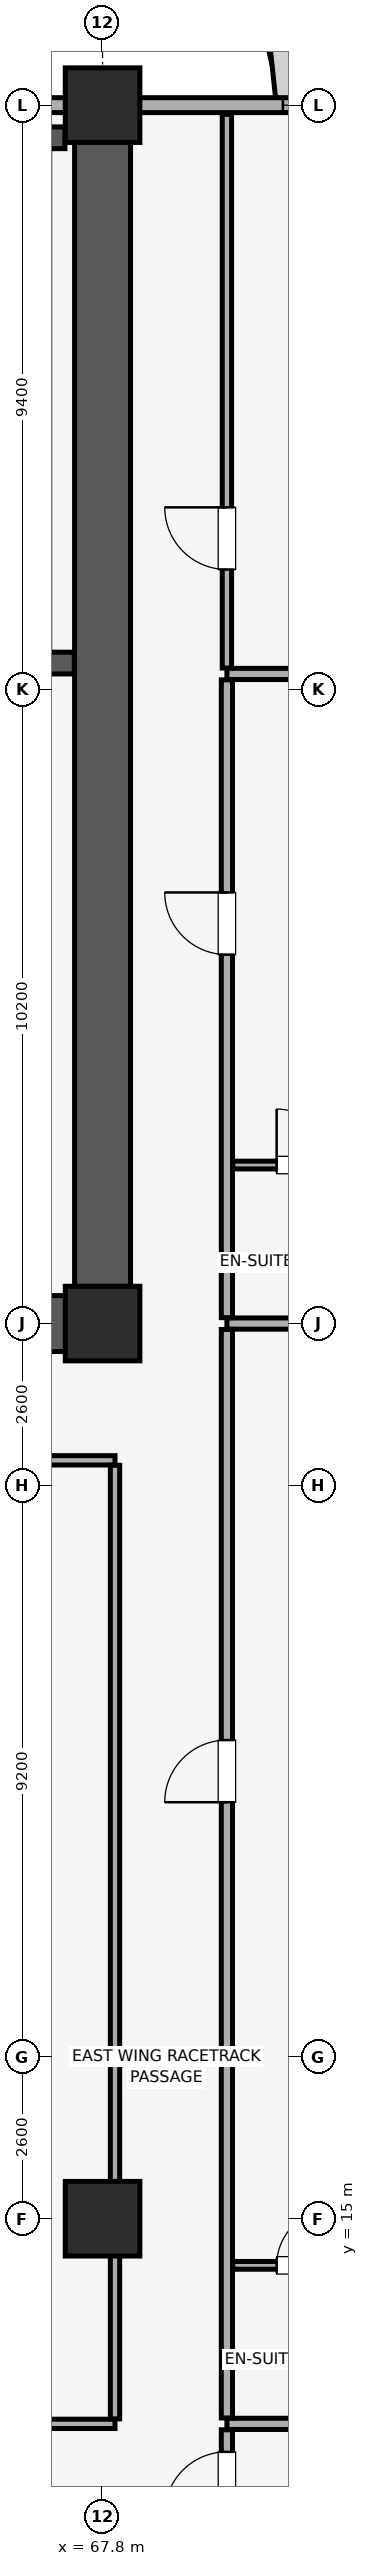
"""IFC4 building model, lengths in metres.
Left out: names, types, materials, properties, quantities, classifications, styles, units other than length and angle.
Written with IfcOpenShell. Run it as: python <this file> out.ifc"""

import sys

from ifc_helpers import new_model, si_unit, direction, frame, frame_2d, origin, origin_2d, place, context, subcontext, project, spatial, rectangle, extrude, element, fill, save


model = new_model("IFC4")
c1 = context("Model", 3, precision=1e-05, world=origin(), true_north=direction((0.0, 1.0)))
c2 = subcontext(c1, "Body", "Model", "MODEL_VIEW")
j1 = project(units=[si_unit("LENGTHUNIT", "METRE"), si_unit("PLANEANGLEUNIT", "RADIAN")], contexts=[c1])
p1 = place(None, origin())
s1 = spatial("IfcSite", under=j1, at=p1, CompositionType="ELEMENT")
p2 = place(p1, origin())
s2 = spatial("IfcBuilding", under=s1, at=p2, CompositionType="ELEMENT")
p3 = place(p2, frame((0.0, 0.0, 135.35)))
s3 = spatial("IfcBuildingStorey", under=s2, at=p3, CompositionType="ELEMENT", Elevation=135.35)
for number, where, z_axis, x_axis in (
    (1, (67.8, 15.0, 0.0), (0.0, 0.0, 1.0), (1.0, 0.0, 0.0)),
    (2, (67.8, 29.4, 0.0), (0.0, 0.0, 1.0), (1.0, 0.0, 0.0)),
    (3, (67.8, 49.0, 0.0), (0.0, 0.0, 1.0), (1.0, 0.0, 0.0)),
):
    element("IfcColumn", number, at=place(p3, frame(where, z_axis=z_axis, x_axis=x_axis)), inside=s3, PredefinedType="COLUMN", context=c2, shape_type="SweptSolid", body=[
        extrude(rectangle(XDim=1.2, YDim=1.2, at=origin_2d()), origin(), (0.0, 0.0, 1.0), 3.56),
    ])
p4 = place(p3, frame((77.0, 49.0, 0.0), z_axis=(0.0, 0.0, 1.0), x_axis=(-1.0, 0.0, 0.0)))
e4 = element("IfcWall", 4, at=p4, inside=s3, PredefinedType="SOLIDWALL", context=c2, shape_type="SweptSolid", body=[
    extrude(rectangle(XDim=70.0, YDim=0.24, at=frame_2d((35.0, 0.0))), origin(), (0.0, 0.0, 1.0), 2.61),
])
p5 = place(p4, frame((63.7, 0.0, 0.85)))
e5 = element("IfcOpeningElement", 5, at=p5, cuts=e4, PredefinedType="OPENING", context=c2, shape_type="SweptSolid", body=[
    extrude(rectangle(XDim=3.0, YDim=1.5, at=frame_2d((1.5, 0.75))), frame((0.0, 0.13, 0.0), z_axis=(0.0, -1.0, 0.0), x_axis=(1.0, 0.0, 0.0)), (0.0, 0.0, 1.0), 0.26),
])
p6 = place(p4, frame((3.3, 0.0, 0.85)))
e6 = element("IfcOpeningElement", 6, at=p6, cuts=e4, PredefinedType="OPENING", context=c2, shape_type="SweptSolid", body=[
    extrude(rectangle(XDim=3.0, YDim=1.5, at=frame_2d((1.5, 0.75))), frame((0.0, 0.13, 0.0), z_axis=(0.0, -1.0, 0.0), x_axis=(1.0, 0.0, 0.0)), (0.0, 0.0, 1.0), 0.26),
])
p7 = place(p4, frame((48.565, 0.0, 0.9)))
e7 = element("IfcOpeningElement", 7, at=p7, cuts=e4, PredefinedType="OPENING", context=c2, shape_type="SweptSolid", body=[
    extrude(rectangle(XDim=1.5, YDim=1.4, at=frame_2d((0.75, 0.7))), frame((0.0, 0.13, 0.0), z_axis=(0.0, -1.0, 0.0), x_axis=(1.0, 0.0, 0.0)), (0.0, 0.0, 1.0), 0.26),
])
p8 = place(p4, frame((41.75, 0.0, 0.9)))
e8 = element("IfcOpeningElement", 8, at=p8, cuts=e4, PredefinedType="OPENING", context=c2, shape_type="SweptSolid", body=[
    extrude(rectangle(XDim=1.5, YDim=1.4, at=frame_2d((0.75, 0.7))), frame((0.0, 0.13, 0.0), z_axis=(0.0, -1.0, 0.0), x_axis=(1.0, 0.0, 0.0)), (0.0, 0.0, 1.0), 0.26),
])
p9 = place(p4, frame((25.3, 0.0, 0.9)))
e9 = element("IfcOpeningElement", 9, at=p9, cuts=e4, PredefinedType="OPENING", context=c2, shape_type="SweptSolid", body=[
    extrude(rectangle(XDim=1.5, YDim=1.4, at=frame_2d((0.75, 0.7))), frame((0.0, 0.13, 0.0), z_axis=(0.0, -1.0, 0.0), x_axis=(1.0, 0.0, 0.0)), (0.0, 0.0, 1.0), 0.26),
])
p10 = place(p4, frame((20.685, 0.0, 0.9)))
e10 = element("IfcOpeningElement", 10, at=p10, cuts=e4, PredefinedType="OPENING", context=c2, shape_type="SweptSolid", body=[
    extrude(rectangle(XDim=1.5, YDim=1.4, at=frame_2d((0.75, 0.7))), frame((0.0, 0.13, 0.0), z_axis=(0.0, -1.0, 0.0), x_axis=(1.0, 0.0, 0.0)), (0.0, 0.0, 1.0), 0.26),
])
p11 = place(p3, frame((67.8, 29.4, 0.0), z_axis=(0.0, 0.0, 1.0), x_axis=(0.0, 1.0, 0.0)))
e11 = element("IfcWall", 11, at=p11, inside=s3, PredefinedType="SHEAR", context=c2, shape_type="SweptSolid", body=[
    extrude(rectangle(XDim=19.2, YDim=0.9, at=frame_2d((9.6, 0.0))), origin(), (0.0, 0.0, 1.0), 3.56),
])
p12 = place(p3, frame((60.4, 29.4, 0.0), z_axis=(0.0, 0.0, 1.0), x_axis=(1.0, 0.0, 0.0)))
e12 = element("IfcWall", 12, at=p12, inside=s3, PredefinedType="SHEAR", context=c2, shape_type="SweptSolid", body=[
    extrude(rectangle(XDim=6.945, YDim=0.9, at=frame_2d((3.473, 0.0))), origin(), (0.0, 0.0, 1.0), 3.56),
])
p13 = place(p3, frame((63.145, 40.025, 0.0), z_axis=(0.0, 0.0, 1.0), x_axis=(1.0, 0.0, 0.0)))
e13 = element("IfcWall", 13, at=p13, inside=s3, PredefinedType="SHEAR", context=c2, shape_type="SweptSolid", body=[
    extrude(rectangle(XDim=4.2, YDim=0.35, at=frame_2d((2.1, 0.0))), origin(), (0.0, 0.0, 1.0), 3.56),
])
p14 = place(p13, frame((1.24, 0.0, 0.0)))
e14 = element("IfcOpeningElement", 14, at=p14, cuts=e13, PredefinedType="OPENING", context=c2, shape_type="SweptSolid", body=[
    extrude(rectangle(XDim=1.15, YDim=2.15, at=frame_2d((0.575, 1.075))), frame((0.0, 0.185, 0.0), z_axis=(0.0, -1.0, 0.0), x_axis=(1.0, 0.0, 0.0)), (0.0, 0.0, 1.0), 0.37),
])
p15 = place(p3, frame((63.145, 48.475, 0.0), z_axis=(0.0, 0.0, 1.0), x_axis=(1.0, 0.0, 0.0)))
e15 = element("IfcWall", 15, at=p15, inside=s3, PredefinedType="SHEAR", context=c2, shape_type="SweptSolid", body=[
    extrude(rectangle(XDim=4.05, YDim=0.35, at=frame_2d((2.025, 0.0))), origin(), (0.0, 0.0, 1.0), 3.56),
])
p16 = place(p3, frame((69.8, 11.7, 0.0), z_axis=(0.0, 0.0, 1.0), x_axis=(1.0, 0.0, 0.0)))
e16 = element("IfcWall", 16, at=p16, inside=s3, PredefinedType="PARTITIONING", context=c2, shape_type="SweptSolid", body=[
    extrude(rectangle(XDim=11.05, YDim=0.18, at=frame_2d((5.525, 0.0))), origin(), (0.0, 0.0, 1.0), 3.56),
])
p17 = place(p3, frame((69.8, 9.895, 0.0), z_axis=(0.0, 0.0, 1.0), x_axis=(0.0, 1.0, 0.0)))
e17 = element("IfcWall", 17, at=p17, inside=s3, PredefinedType="PARTITIONING", context=c2, shape_type="SweptSolid", body=[
    extrude(rectangle(XDim=1.71, YDim=0.18, at=frame_2d((0.855, 0.0))), origin(), (0.0, 0.0, 1.0), 3.56),
])
p18 = place(p17, frame((0.355, 0.0, 0.0)))
e18 = element("IfcOpeningElement", 18, at=p18, cuts=e17, PredefinedType="OPENING", context=c2, shape_type="SweptSolid", body=[
    extrude(rectangle(XDim=1.0, YDim=2.15, at=frame_2d((0.5, 1.075))), frame((0.0, 0.1, 0.0), z_axis=(0.0, -1.0, 0.0), x_axis=(1.0, 0.0, 0.0)), (0.0, 0.0, 1.0), 0.2),
])
p19 = place(p3, frame((69.8, 29.4, 0.0), z_axis=(0.0, 0.0, 1.0), x_axis=(1.0, 0.0, 0.0)))
e19 = element("IfcWall", 19, at=p19, inside=s3, PredefinedType="PARTITIONING", context=c2, shape_type="SweptSolid", body=[
    extrude(rectangle(XDim=11.05, YDim=0.18, at=frame_2d((5.525, 0.0))), origin(), (0.0, 0.0, 1.0), 2.91),
])
p20 = place(p3, frame((69.8, 11.795, 0.0), z_axis=(0.0, 0.0, 1.0), x_axis=(0.0, 1.0, 0.0)))
e20 = element("IfcWall", 20, at=p20, inside=s3, PredefinedType="PARTITIONING", context=c2, shape_type="SweptSolid", body=[
    extrude(rectangle(XDim=17.51, YDim=0.18, at=frame_2d((8.755, 0.0))), origin(), (0.0, 0.0, 1.0), 3.56),
])
p21 = place(p20, frame((9.905, 0.0, 0.0)))
e21 = element("IfcOpeningElement", 21, at=p21, cuts=e20, PredefinedType="OPENING", context=c2, shape_type="SweptSolid", body=[
    extrude(rectangle(XDim=1.0, YDim=2.15, at=frame_2d((0.5, 1.075))), frame((0.0, 0.1, 0.0), z_axis=(0.0, -1.0, 0.0), x_axis=(1.0, 0.0, 0.0)), (0.0, 0.0, 1.0), 0.2),
])
p22 = place(p3, frame((69.895, 14.25, 0.0), z_axis=(0.0, 0.0, 1.0), x_axis=(1.0, 0.0, 0.0)))
e22 = element("IfcWall", 22, at=p22, inside=s3, PredefinedType="PARTITIONING", context=c2, shape_type="SweptSolid", body=[
    extrude(rectangle(XDim=2.405, YDim=0.125, at=frame_2d((1.203, 0.0))), origin(), (0.0, 0.0, 1.0), 3.56),
])
p23 = place(p22, frame((0.705, 0.0, 0.0)))
e23 = element("IfcOpeningElement", 23, at=p23, cuts=e22, PredefinedType="OPENING", context=c2, shape_type="SweptSolid", body=[
    extrude(rectangle(XDim=0.9, YDim=2.1, at=frame_2d((0.45, 1.05))), frame((0.0, 0.073, 0.0), z_axis=(0.0, -1.0, 0.0), x_axis=(1.0, 0.0, 0.0)), (0.0, 0.0, 1.0), 0.145),
])
p24 = place(p3, frame((59.0, 11.7, 0.0), z_axis=(0.0, 0.0, 1.0), x_axis=(1.0, 0.0, 0.0)))
e24 = element("IfcWall", 24, at=p24, inside=s3, PredefinedType="PARTITIONING", context=c2, shape_type="SweptSolid", body=[
    extrude(rectangle(XDim=9.0, YDim=0.15, at=frame_2d((4.5, 0.0))), origin(), (0.0, 0.0, 1.0), 3.56),
])
p25 = place(p3, frame((59.0, 27.2, 0.0), z_axis=(0.0, 0.0, 1.0), x_axis=(1.0, 0.0, 0.0)))
e25 = element("IfcWall", 25, at=p25, inside=s3, PredefinedType="PARTITIONING", context=c2, shape_type="SweptSolid", body=[
    extrude(rectangle(XDim=9.0, YDim=0.15, at=frame_2d((4.5, 0.0))), origin(), (0.0, 0.0, 1.0), 3.56),
])
p26 = place(p25, frame((4.0, 0.0, 0.0)))
e26 = element("IfcOpeningElement", 26, at=p26, cuts=e25, PredefinedType="OPENING", context=c2, shape_type="SweptSolid", body=[
    extrude(rectangle(XDim=1.0, YDim=2.15, at=frame_2d((0.5, 1.075))), frame((0.0, 0.085, 0.0), z_axis=(0.0, -1.0, 0.0), x_axis=(1.0, 0.0, 0.0)), (0.0, 0.0, 1.0), 0.17),
])
p27 = place(p3, frame((68.0, 11.78, 0.0), z_axis=(0.0, 0.0, 1.0), x_axis=(0.0, 1.0, 0.0)))
e27 = element("IfcWall", 27, at=p27, inside=s3, PredefinedType="PARTITIONING", context=c2, shape_type="SweptSolid", body=[
    extrude(rectangle(XDim=15.34, YDim=0.15, at=frame_2d((7.67, 0.0))), origin(), (0.0, 0.0, 1.0), 3.01),
])
p28 = place(p3, frame((69.8, 39.85, 0.0), z_axis=(0.0, 0.0, 1.0), x_axis=(1.0, 0.0, 0.0)))
e28 = element("IfcWall", 28, at=p28, inside=s3, PredefinedType="PARTITIONING", context=c2, shape_type="SweptSolid", body=[
    extrude(rectangle(XDim=11.05, YDim=0.18, at=frame_2d((5.525, 0.0))), origin(), (0.0, 0.0, 1.0), 3.56),
])
p29 = place(p3, frame((69.8, 29.495, 0.0), z_axis=(0.0, 0.0, 1.0), x_axis=(0.0, 1.0, 0.0)))
e29 = element("IfcWall", 29, at=p29, inside=s3, PredefinedType="PARTITIONING", context=c2, shape_type="SweptSolid", body=[
    extrude(rectangle(XDim=10.26, YDim=0.18, at=frame_2d((5.13, 0.0))), origin(), (0.0, 0.0, 1.0), 3.56),
])
p30 = place(p29, frame((5.84, 0.0, 0.0)))
e30 = element("IfcOpeningElement", 30, at=p30, cuts=e29, PredefinedType="OPENING", context=c2, shape_type="SweptSolid", body=[
    extrude(rectangle(XDim=1.0, YDim=2.15, at=frame_2d((0.5, 1.075))), frame((0.0, 0.1, 0.0), z_axis=(0.0, -1.0, 0.0), x_axis=(1.0, 0.0, 0.0)), (0.0, 0.0, 1.0), 0.2),
])
p31 = place(p3, frame((69.895, 31.95, 0.0), z_axis=(0.0, 0.0, 1.0), x_axis=(1.0, 0.0, 0.0)))
e31 = element("IfcWall", 31, at=p31, inside=s3, PredefinedType="PARTITIONING", context=c2, shape_type="SweptSolid", body=[
    extrude(rectangle(XDim=2.405, YDim=0.125, at=frame_2d((1.203, 0.0))), origin(), (0.0, 0.0, 1.0), 3.56),
])
p32 = place(p31, frame((0.705, 0.0, 0.0)))
e32 = element("IfcOpeningElement", 32, at=p32, cuts=e31, PredefinedType="OPENING", context=c2, shape_type="SweptSolid", body=[
    extrude(rectangle(XDim=0.9, YDim=2.1, at=frame_2d((0.45, 1.05))), frame((0.0, 0.073, 0.0), z_axis=(0.0, -1.0, 0.0), x_axis=(1.0, 0.0, 0.0)), (0.0, 0.0, 1.0), 0.145),
])
p33 = place(p3, frame((69.8, 39.945, 0.0), z_axis=(0.0, 0.0, 1.0), x_axis=(0.0, 1.0, 0.0)))
e33 = element("IfcWall", 33, at=p33, inside=s3, PredefinedType="PARTITIONING", context=c2, shape_type="SweptSolid", body=[
    extrude(rectangle(XDim=8.905, YDim=0.15, at=frame_2d((4.453, 0.0))), origin(), (0.0, 0.0, 1.0), 3.56),
])
p34 = place(p33, frame((1.585, 0.0, 0.0)))
e34 = element("IfcOpeningElement", 34, at=p34, cuts=e33, PredefinedType="OPENING", context=c2, shape_type="SweptSolid", body=[
    extrude(rectangle(XDim=1.0, YDim=2.15, at=frame_2d((0.5, 1.075))), frame((0.0, 0.085, 0.0), z_axis=(0.0, -1.0, 0.0), x_axis=(1.0, 0.0, 0.0)), (0.0, 0.0, 1.0), 0.17),
])
p35 = place(p6, origin())
e35 = element("IfcWindow", 35, at=p35, inside=s3, PartitioningType="SINGLE_PANEL", PredefinedType="WINDOW", context=c2, shape_type="SweptSolid", body=[
    extrude(rectangle(XDim=3.0, YDim=1.5, at=frame_2d((1.5, 0.75))), frame((0.0, 0.03, 0.0), z_axis=(0.0, -1.0, 0.0), x_axis=(1.0, 0.0, 0.0)), (0.0, 0.0, 1.0), 0.06),
])
fill(e6, e35)
p36 = place(p18, origin())
e36 = element("IfcDoor", 36, at=p36, inside=s3, OperationType="SINGLE_SWING_LEFT", PredefinedType="DOOR", context=c2, shape_type="SweptSolid", body=[
    extrude(rectangle(XDim=1.0, YDim=2.15, at=frame_2d((0.5, 1.075))), frame((0.0, 0.025, 0.0), z_axis=(0.0, -1.0, 0.0), x_axis=(1.0, 0.0, 0.0)), (0.0, 0.0, 1.0), 0.05),
])
fill(e18, e36)
p37 = place(p21, origin())
e37 = element("IfcDoor", 37, at=p37, inside=s3, OperationType="SINGLE_SWING_LEFT", PredefinedType="DOOR", context=c2, shape_type="SweptSolid", body=[
    extrude(rectangle(XDim=1.0, YDim=2.15, at=frame_2d((0.5, 1.075))), frame((0.0, 0.025, 0.0), z_axis=(0.0, -1.0, 0.0), x_axis=(1.0, 0.0, 0.0)), (0.0, 0.0, 1.0), 0.05),
])
fill(e21, e37)
p38 = place(p23, origin())
e38 = element("IfcDoor", 38, at=p38, inside=s3, OperationType="SINGLE_SWING_RIGHT", PredefinedType="DOOR", context=c2, shape_type="SweptSolid", body=[
    extrude(rectangle(XDim=0.9, YDim=2.1, at=frame_2d((0.45, 1.05))), frame((0.0, 0.025, 0.0), z_axis=(0.0, -1.0, 0.0), x_axis=(1.0, 0.0, 0.0)), (0.0, 0.0, 1.0), 0.05),
])
fill(e23, e38)
p39 = place(p30, origin())
e39 = element("IfcDoor", 39, at=p39, inside=s3, OperationType="SINGLE_SWING_RIGHT", PredefinedType="DOOR", context=c2, shape_type="SweptSolid", body=[
    extrude(rectangle(XDim=1.0, YDim=2.15, at=frame_2d((0.5, 1.075))), frame((0.0, 0.025, 0.0), z_axis=(0.0, -1.0, 0.0), x_axis=(1.0, 0.0, 0.0)), (0.0, 0.0, 1.0), 0.05),
])
fill(e30, e39)
p40 = place(p32, origin())
e40 = element("IfcDoor", 40, at=p40, inside=s3, OperationType="SINGLE_SWING_LEFT", PredefinedType="DOOR", context=c2, shape_type="SweptSolid", body=[
    extrude(rectangle(XDim=0.9, YDim=2.1, at=frame_2d((0.45, 1.05))), frame((0.0, 0.025, 0.0), z_axis=(0.0, -1.0, 0.0), x_axis=(1.0, 0.0, 0.0)), (0.0, 0.0, 1.0), 0.05),
])
fill(e32, e40)
p41 = place(p34, origin())
e41 = element("IfcDoor", 41, at=p41, inside=s3, OperationType="SINGLE_SWING_RIGHT", PredefinedType="DOOR", context=c2, shape_type="SweptSolid", body=[
    extrude(rectangle(XDim=1.0, YDim=2.15, at=frame_2d((0.5, 1.075))), frame((0.0, 0.025, 0.0), z_axis=(0.0, -1.0, 0.0), x_axis=(1.0, 0.0, 0.0)), (0.0, 0.0, 1.0), 0.05),
])
fill(e34, e41)
save(model, sys.argv[1])
